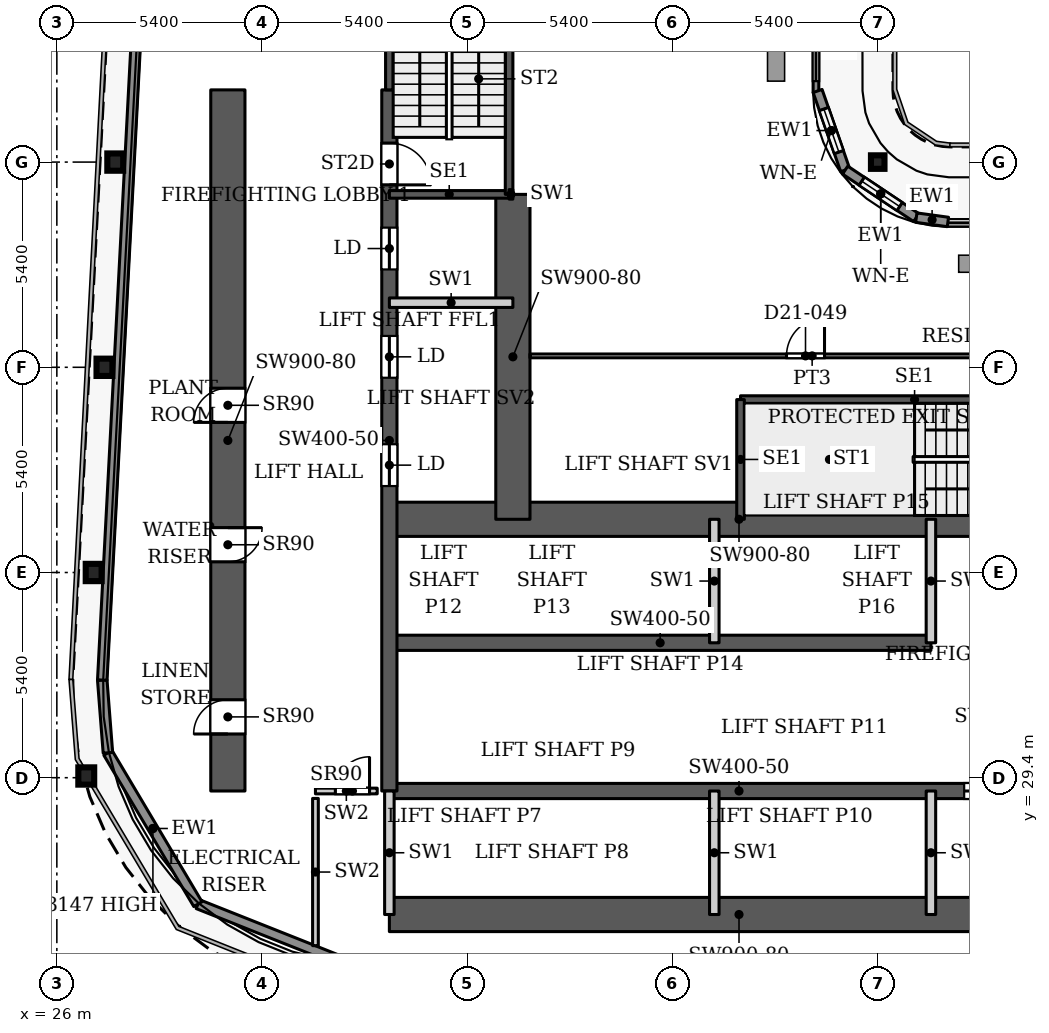
"""IFC4 building model, lengths in metres.
Left out: names, types, materials, properties, quantities, classifications, styles, units other than length and angle.
Written with IfcOpenShell. Run it as: python <this file> out.ifc"""

import sys

from ifc_helpers import new_model, si_unit, direction, frame, frame_2d, origin, origin_2d, place, context, subcontext, project, spatial, rectangle, hollow_rectangle, i_section, extrude, source, transform, mapped, element, fill, save


model = new_model("IFC4")
c1 = context("Model", 3, precision=1e-05, world=origin(), true_north=direction((0.0, 1.0)))
c2 = subcontext(c1, "Body", "Model", "MODEL_VIEW")
j1 = project(units=[si_unit("LENGTHUNIT", "METRE"), si_unit("PLANEANGLEUNIT", "RADIAN")], contexts=[c1])
p1 = place(None, origin())
s1 = spatial("IfcSite", under=j1, at=p1, CompositionType="ELEMENT")
p2 = place(p1, origin())
s2 = spatial("IfcBuilding", under=s1, at=p2, CompositionType="ELEMENT")
p3 = place(p2, frame((0.0, 0.0, 98.0)))
s3 = spatial("IfcBuildingStorey", under=s2, at=p3, CompositionType="ELEMENT", Elevation=98.0)
for number, where, z_axis, x_axis in (
    (1, (26.774, 29.445, 0.0), (0.0, 0.0, 1.0), (1.0, 0.0, 0.0)),
    (2, (26.969, 34.8, 0.0), (0.0, 0.0, 1.0), (1.0, 0.0, 0.0)),
    (3, (27.253, 40.2, 0.0), (0.0, 0.0, 1.0), (1.0, 0.0, 0.0)),
    (4, (27.537, 45.6, 0.0), (0.0, 0.0, 1.0), (1.0, 0.0, 0.0)),
):
    element("IfcColumn", number, at=place(p3, frame(where, z_axis=z_axis, x_axis=x_axis)), inside=s3, PredefinedType="COLUMN", context=c2, shape_type="SweptSolid", body=[
        extrude(i_section(OverallWidth=0.418, OverallDepth=0.455, WebThickness=0.042, FlangeThickness=0.068, FilletRadius=0.014, at=origin_2d()), origin(), (0.0, 0.0, 1.0), 3.9),
    ])
p4 = place(p3, frame((47.6, 45.6, 0.0), z_axis=(0.0, 0.0, 1.0), x_axis=(1.0, 0.0, 0.0)))
e5 = element("IfcColumn", 5, at=p4, inside=s3, PredefinedType="COLUMN", context=c2, shape_type="SweptSolid", body=[
    extrude(hollow_rectangle(XDim=0.356, YDim=0.356, WallThickness=0.016, InnerFilletRadius=0.016, OuterFilletRadius=0.032, at=origin_2d()), origin(), (0.0, 0.0, 1.0), 3.9),
])
p5 = place(p3, frame((34.75, 25.8, 0.0), z_axis=(0.0, 0.0, 1.0), x_axis=(1.0, 0.0, 0.0)))
e6 = element("IfcWall", 6, at=p5, inside=s3, PredefinedType="SHEAR", context=c2, shape_type="SweptSolid", body=[
    extrude(rectangle(XDim=18.4, YDim=0.9, at=frame_2d((9.2, 0.0))), origin(), (0.0, 0.0, 1.0), 3.9),
])
p6 = place(p3, frame((34.75, 29.05, 0.0), z_axis=(0.0, 0.0, 1.0), x_axis=(1.0, 0.0, 0.0)))
e7 = element("IfcWall", 7, at=p6, inside=s3, PredefinedType="SHEAR", context=c2, shape_type="SweptSolid", body=[
    extrude(rectangle(XDim=18.4, YDim=0.4, at=frame_2d((9.2, 0.0))), origin(), (0.0, 0.0, 1.0), 3.9),
])
p7 = place(p6, frame((15.125, 0.0, 0.0)))
e8 = element("IfcOpeningElement", 8, at=p7, cuts=e7, PredefinedType="OPENING", context=c2, shape_type="SweptSolid", body=[
    extrude(rectangle(XDim=1.1, YDim=2.2, at=frame_2d((0.55, 1.1))), frame((0.0, 0.21, 0.0), z_axis=(0.0, -1.0, 0.0), x_axis=(1.0, 0.0, 0.0)), (0.0, 0.0, 1.0), 0.42),
])
p8 = place(p3, frame((34.75, 32.95, 0.0), z_axis=(0.0, 0.0, 1.0), x_axis=(1.0, 0.0, 0.0)))
e9 = element("IfcWall", 9, at=p8, inside=s3, PredefinedType="SHEAR", context=c2, shape_type="SweptSolid", body=[
    extrude(rectangle(XDim=14.25, YDim=0.4, at=frame_2d((7.125, 0.0))), origin(), (0.0, 0.0, 1.0), 3.9),
])
p9 = place(p3, frame((34.75, 36.2, 0.0), z_axis=(0.0, 0.0, 1.0), x_axis=(1.0, 0.0, 0.0)))
e10 = element("IfcWall", 10, at=p9, inside=s3, PredefinedType="SHEAR", context=c2, shape_type="SweptSolid", body=[
    extrude(rectangle(XDim=18.4, YDim=0.9, at=frame_2d((9.2, 0.0))), origin(), (0.0, 0.0, 1.0), 3.9),
])
p10 = place(p9, frame((16.9, 0.0, 0.0)))
e11 = element("IfcOpeningElement", 11, at=p10, cuts=e10, PredefinedType="OPENING", context=c2, shape_type="SweptSolid", body=[
    extrude(rectangle(XDim=1.0, YDim=2.2, at=frame_2d((0.5, 1.1))), frame((0.0, 0.46, 0.0), z_axis=(0.0, -1.0, 0.0), x_axis=(1.0, 0.0, 0.0)), (0.0, 0.0, 1.0), 0.92),
])
p11 = place(p3, frame((34.75, 29.05, 0.0), z_axis=(0.0, 0.0, 1.0), x_axis=(0.0, 1.0, 0.0)))
e12 = element("IfcWall", 12, at=p11, inside=s3, PredefinedType="SHEAR", context=c2, shape_type="SweptSolid", body=[
    extrude(rectangle(XDim=18.45, YDim=0.4, at=frame_2d((9.225, 0.0))), origin(), (0.0, 0.0, 1.0), 3.9),
])
p12 = place(p11, frame((8.025, 0.0, 0.0)))
e13 = element("IfcOpeningElement", 13, at=p12, cuts=e12, PredefinedType="OPENING", context=c2, shape_type="SweptSolid", body=[
    extrude(rectangle(XDim=1.1, YDim=2.2, at=frame_2d((0.55, 1.1))), frame((0.0, 0.21, 0.0), z_axis=(0.0, -1.0, 0.0), x_axis=(1.0, 0.0, 0.0)), (0.0, 0.0, 1.0), 0.42),
])
p13 = place(p11, frame((10.875, 0.0, 0.0)))
e14 = element("IfcOpeningElement", 14, at=p13, cuts=e12, PredefinedType="OPENING", context=c2, shape_type="SweptSolid", body=[
    extrude(rectangle(XDim=1.1, YDim=2.2, at=frame_2d((0.55, 1.1))), frame((0.0, 0.21, 0.0), z_axis=(0.0, -1.0, 0.0), x_axis=(1.0, 0.0, 0.0)), (0.0, 0.0, 1.0), 0.42),
])
p14 = place(p11, frame((13.725, 0.0, 0.0)))
e15 = element("IfcOpeningElement", 15, at=p14, cuts=e12, PredefinedType="OPENING", context=c2, shape_type="SweptSolid", body=[
    extrude(rectangle(XDim=1.1, YDim=2.2, at=frame_2d((0.55, 1.1))), frame((0.0, 0.21, 0.0), z_axis=(0.0, -1.0, 0.0), x_axis=(1.0, 0.0, 0.0)), (0.0, 0.0, 1.0), 0.42),
])
p15 = place(p11, frame((15.95, 0.0, 0.0)))
e16 = element("IfcOpeningElement", 16, at=p15, cuts=e12, PredefinedType="OPENING", context=c2, shape_type="SweptSolid", body=[
    extrude(rectangle(XDim=1.1, YDim=2.2, at=frame_2d((0.55, 1.1))), frame((0.0, 0.21, 0.0), z_axis=(0.0, -1.0, 0.0), x_axis=(1.0, 0.0, 0.0)), (0.0, 0.0, 1.0), 0.42),
])
p16 = place(p3, frame((38.0, 36.2, 0.0), z_axis=(0.0, 0.0, 1.0), x_axis=(0.0, 1.0, 0.0)))
e17 = element("IfcWall", 17, at=p16, inside=s3, PredefinedType="SHEAR", context=c2, shape_type="SweptSolid", body=[
    extrude(rectangle(XDim=8.55, YDim=0.9, at=frame_2d((4.275, 0.0))), origin(), (0.0, 0.0, 1.0), 3.9),
])
p17 = place(p3, frame((30.5, 29.05, 0.0), z_axis=(0.0, 0.0, 1.0), x_axis=(0.0, 1.0, 0.0)))
e18 = element("IfcWall", 18, at=p17, inside=s3, PredefinedType="SHEAR", context=c2, shape_type="SweptSolid", body=[
    extrude(rectangle(XDim=18.45, YDim=0.9, at=frame_2d((9.225, 0.0))), origin(), (0.0, 0.0, 1.0), 3.9),
])
p18 = place(p17, frame((1.5, 0.0, 0.0)))
e19 = element("IfcOpeningElement", 19, at=p18, cuts=e18, PredefinedType="OPENING", context=c2, shape_type="SweptSolid", body=[
    extrude(rectangle(XDim=0.9, YDim=2.2, at=frame_2d((0.45, 1.1))), frame((0.0, 0.46, 0.0), z_axis=(0.0, -1.0, 0.0), x_axis=(1.0, 0.0, 0.0)), (0.0, 0.0, 1.0), 0.92),
])
p19 = place(p17, frame((6.03, 0.0, 0.0)))
e20 = element("IfcOpeningElement", 20, at=p19, cuts=e18, PredefinedType="OPENING", context=c2, shape_type="SweptSolid", body=[
    extrude(rectangle(XDim=0.9, YDim=2.2, at=frame_2d((0.45, 1.1))), frame((0.0, 0.46, 0.0), z_axis=(0.0, -1.0, 0.0), x_axis=(1.0, 0.0, 0.0)), (0.0, 0.0, 1.0), 0.92),
])
p20 = place(p17, frame((9.7, 0.0, 0.0)))
e21 = element("IfcOpeningElement", 21, at=p20, cuts=e18, PredefinedType="OPENING", context=c2, shape_type="SweptSolid", body=[
    extrude(rectangle(XDim=0.9, YDim=2.2, at=frame_2d((0.45, 1.1))), frame((0.0, 0.46, 0.0), z_axis=(0.0, -1.0, 0.0), x_axis=(1.0, 0.0, 0.0)), (0.0, 0.0, 1.0), 0.92),
])
p21 = place(p3, frame((45.975, 49.83, 0.0), z_axis=(0.0, 0.0, 1.0), x_axis=(0.0, -1.0, 0.0)))
e22 = element("IfcWall", 22, at=p21, inside=s3, PredefinedType="SOLIDWALL", context=c2, shape_type="SweptSolid", body=[
    extrude(rectangle(XDim=2.4, YDim=0.15, at=frame_2d((1.2, 0.0))), origin(), (0.0, 0.0, 1.0), 3.75),
])
p22 = place(p21, frame((0.3, 0.0, 0.0)))
e23 = element("IfcOpeningElement", 23, at=p22, cuts=e22, PredefinedType="OPENING", context=c2, shape_type="SweptSolid", body=[
    extrude(rectangle(XDim=1.8, YDim=2.4, at=frame_2d((0.9, 1.2))), frame((0.0, 0.085, 0.0), z_axis=(0.0, -1.0, 0.0), x_axis=(1.0, 0.0, 0.0)), (0.0, 0.0, 1.0), 0.17),
])
p23 = place(p3, frame((46.018, 47.471, 0.0), z_axis=(0.0, 0.0, 1.0), x_axis=(0.328791208903, -0.944402637093, 0.0)))
e24 = element("IfcWall", 24, at=p23, inside=s3, PredefinedType="SOLIDWALL", context=c2, shape_type="SweptSolid", body=[
    extrude(rectangle(XDim=2.205, YDim=0.25, at=frame_2d((1.102, 0.0))), origin(), (0.0, 0.0, 1.0), 3.75),
])
p24 = place(p23, frame((0.503, 0.0, 0.6)))
e25 = element("IfcOpeningElement", 25, at=p24, cuts=e24, PredefinedType="OPENING", context=c2, shape_type="SweptSolid", body=[
    extrude(rectangle(XDim=1.2, YDim=2.1, at=frame_2d((0.6, 1.05))), frame((0.0, 0.135, 0.0), z_axis=(0.0, -1.0, 0.0), x_axis=(1.0, 0.0, 0.0)), (0.0, 0.0, 1.0), 0.27),
])
p25 = place(p3, frame((46.743, 45.389, 0.0), z_axis=(0.0, 0.0, 1.0), x_axis=(0.831449265529, -0.555600682912, 0.0)))
e26 = element("IfcWall", 26, at=p25, inside=s3, PredefinedType="SOLIDWALL", context=c2, shape_type="SweptSolid", body=[
    extrude(rectangle(XDim=2.251, YDim=0.25, at=frame_2d((1.126, 0.0))), origin(), (0.0, 0.0, 1.0), 3.75),
])
p26 = place(p25, frame((0.525, 0.0, 0.6)))
e27 = element("IfcOpeningElement", 27, at=p26, cuts=e26, PredefinedType="OPENING", context=c2, shape_type="SweptSolid", body=[
    extrude(rectangle(XDim=1.2, YDim=2.1, at=frame_2d((0.6, 1.05))), frame((0.0, 0.135, 0.0), z_axis=(0.0, -1.0, 0.0), x_axis=(1.0, 0.0, 0.0)), (0.0, 0.0, 1.0), 0.27),
])
p27 = place(p3, frame((48.615, 44.138, 0.0), z_axis=(0.0, 0.0, 1.0), x_axis=(0.990741504246, -0.135761819977, 0.0)))
e28 = element("IfcWall", 28, at=p27, inside=s3, PredefinedType="SOLIDWALL", context=c2, shape_type="SweptSolid", body=[
    extrude(rectangle(XDim=0.84, YDim=0.25, at=frame_2d((0.42, 0.0))), origin(), (0.0, 0.0, 1.0), 3.75),
])
p28 = place(p3, frame((34.039, 24.353, 0.0), z_axis=(0.0, 0.0, 1.0), x_axis=(-0.929352825399, 0.369192803184, 0.0)))
e29 = element("IfcWall", 29, at=p28, inside=s3, PredefinedType="SOLIDWALL", context=c2, shape_type="SweptSolid", body=[
    extrude(rectangle(XDim=4.656, YDim=0.25, at=frame_2d((2.328, 0.0))), origin(), (0.0, 0.0, 1.0), 3.75),
])
p29 = place(p3, frame((29.712, 26.072, 0.0), z_axis=(0.0, 0.0, 1.0), x_axis=(-0.511028049012, 0.859564036662, 0.0)))
e30 = element("IfcWall", 30, at=p29, inside=s3, PredefinedType="SOLIDWALL", context=c2, shape_type="SweptSolid", body=[
    extrude(rectangle(XDim=4.634, YDim=0.25, at=frame_2d((2.317, 0.0))), origin(), (0.0, 0.0, 1.0), 3.147),
])
p30 = place(p3, frame((27.344, 30.055, 0.0), z_axis=(0.0, 0.0, 1.0), x_axis=(-0.077571675317, 0.99698677784, 0.0)))
e31 = element("IfcWall", 31, at=p30, inside=s3, PredefinedType="SOLIDWALL", context=c2, shape_type="SweptSolid", body=[
    extrude(rectangle(XDim=1.92, YDim=0.25, at=frame_2d((0.96, 0.0))), origin(), (0.0, 0.0, 1.0), 3.75),
])
p31 = place(p3, frame((27.195, 31.969, 0.0), z_axis=(0.0, 0.0, 1.0), x_axis=(0.052559748861, 0.998617781135, 0.0)))
e32 = element("IfcWall", 32, at=p31, inside=s3, PredefinedType="SOLIDWALL", context=c2, shape_type="SweptSolid", body=[
    extrude(rectangle(XDim=55.972, YDim=0.25, at=frame_2d((27.986, 0.0))), origin(), (0.0, 0.0, 1.0), 3.75),
])
p32 = place(p3, frame((43.99, 39.35, 0.0), z_axis=(0.0, 0.0, 1.0), x_axis=(1.0, 0.0, 0.0)))
e33 = element("IfcWall", 33, at=p32, inside=s3, PredefinedType="SHEAR", context=c2, shape_type="SweptSolid", body=[
    extrude(rectangle(XDim=9.16, YDim=0.2, at=frame_2d((4.58, 0.0))), origin(), (0.0, 0.0, 1.0), 3.9),
])
p33 = place(p3, frame((43.99, 36.2, 0.0), z_axis=(0.0, 0.0, 1.0), x_axis=(0.0, 1.0, 0.0)))
e34 = element("IfcWall", 34, at=p33, inside=s3, PredefinedType="SHEAR", context=c2, shape_type="SweptSolid", body=[
    extrude(rectangle(XDim=3.15, YDim=0.2, at=frame_2d((1.575, 0.0))), origin(), (0.0, 0.0, 1.0), 3.9),
])
p34 = place(p3, frame((34.75, 44.75, 0.0), z_axis=(0.0, 0.0, 1.0), x_axis=(1.0, 0.0, 0.0)))
e35 = element("IfcWall", 35, at=p34, inside=s3, PredefinedType="SHEAR", context=c2, shape_type="SweptSolid", body=[
    extrude(rectangle(XDim=3.15, YDim=0.2, at=frame_2d((1.575, 0.0))), origin(), (0.0, 0.0, 1.0), 3.9),
])
p35 = place(p3, frame((34.75, 47.5, 0.0), z_axis=(0.0, 0.0, 1.0), x_axis=(0.0, 1.0, 0.0)))
e36 = element("IfcWall", 36, at=p35, inside=s3, PredefinedType="SHEAR", context=c2, shape_type="SweptSolid", body=[
    extrude(rectangle(XDim=6.41, YDim=0.2, at=frame_2d((3.205, 0.0))), origin(), (0.0, 0.0, 1.0), 3.9),
])
p36 = place(p3, frame((37.9, 44.75, 0.0), z_axis=(0.0, 0.0, 1.0), x_axis=(0.0, 1.0, 0.0)))
e37 = element("IfcWall", 37, at=p36, inside=s3, PredefinedType="SHEAR", context=c2, shape_type="SweptSolid", body=[
    extrude(rectangle(XDim=9.16, YDim=0.2, at=frame_2d((4.58, 0.0))), origin(), (0.0, 0.0, 1.0), 3.9),
])
for number, where, z_axis, x_axis in (
    (38, (34.75, 25.8, 0.0), (0.0, 0.0, 1.0), (0.0, 1.0, 0.0)),
    (39, (43.3, 25.8, 0.0), (0.0, 0.0, 1.0), (0.0, 1.0, 0.0)),
    (40, (43.3, 32.95, 0.0), (0.0, 0.0, 1.0), (0.0, 1.0, 0.0)),
    (41, (49.0, 25.8, 0.0), (0.0, 0.0, 1.0), (0.0, 1.0, 0.0)),
    (42, (49.0, 32.95, 0.0), (0.0, 0.0, 1.0), (0.0, 1.0, 0.0)),
    (43, (34.75, 41.9, 0.0), (0.0, 0.0, 1.0), (1.0, 0.0, 0.0)),
):
    element("IfcWall", number, at=place(p3, frame(where, z_axis=z_axis, x_axis=x_axis)), inside=s3, PredefinedType="PARTITIONING", context=c2, shape_type="SweptSolid", body=[
        extrude(rectangle(XDim=3.25, YDim=0.25, at=frame_2d((1.625, 0.0))), origin(), (0.0, 0.0, 1.0), 3.9),
    ])
p37 = place(p3, frame((37.9, 44.75, 0.0), z_axis=(0.0, 0.0, 1.0), x_axis=(1.0, 0.0, 0.0)))
e44 = element("IfcWall", 44, at=p37, inside=s3, PredefinedType="PARTITIONING", context=c2, shape_type="SweptSolid", body=[
    extrude(rectangle(XDim=0.1, YDim=0.25, at=frame_2d((0.05, 0.0))), origin(), (0.0, 0.0, 1.0), 3.9),
])
p38 = place(p3, frame((32.805, 29.05, 0.0), z_axis=(0.0, 0.0, 1.0), x_axis=(1.0, 0.0, 0.0)))
e45 = element("IfcWall", 45, at=p38, inside=s3, PredefinedType="PARTITIONING", context=c2, shape_type="SweptSolid", body=[
    extrude(rectangle(XDim=1.625, YDim=0.15, at=frame_2d((0.812, 0.0))), origin(), (0.0, 0.0, 1.0), 3.9),
])
p39 = place(p38, frame((0.523, 0.0, 0.0)))
e46 = element("IfcOpeningElement", 46, at=p39, cuts=e45, PredefinedType="OPENING", context=c2, shape_type="SweptSolid", body=[
    extrude(rectangle(XDim=0.9, YDim=2.2, at=frame_2d((0.45, 1.1))), frame((0.0, 0.085, 0.0), z_axis=(0.0, -1.0, 0.0), x_axis=(1.0, 0.0, 0.0)), (0.0, 0.0, 1.0), 0.17),
])
p40 = place(p3, frame((32.805, 24.98, 0.0), z_axis=(0.0, 0.0, 1.0), x_axis=(0.0, 1.0, 0.0)))
e47 = element("IfcWall", 47, at=p40, inside=s3, PredefinedType="PARTITIONING", context=c2, shape_type="SweptSolid", body=[
    extrude(rectangle(XDim=3.875, YDim=0.15, at=frame_2d((1.938, 0.0))), origin(), (0.0, 0.0, 1.0), 3.9),
])
p41 = place(p3, frame((38.449, 40.5, 0.0), z_axis=(0.0, 0.0, 1.0), x_axis=(1.0, 0.0, 0.0)))
e48 = element("IfcWall", 48, at=p41, inside=s3, PredefinedType="PARTITIONING", context=c2, shape_type="SweptSolid", body=[
    extrude(rectangle(XDim=14.851, YDim=0.1, at=frame_2d((7.426, 0.0))), origin(), (0.0, 0.0, 1.0), 3.6),
])
p42 = place(p41, frame((6.751, 0.0, 0.0)))
e49 = element("IfcOpeningElement", 49, at=p42, cuts=e48, PredefinedType="OPENING", context=c2, shape_type="SweptSolid", body=[
    extrude(rectangle(XDim=1.0, YDim=2.1, at=frame_2d((0.5, 1.05))), frame((0.0, 0.06, 0.0), z_axis=(0.0, -1.0, 0.0), x_axis=(1.0, 0.0, 0.0)), (0.0, 0.0, 1.0), 0.12),
])
m1 = source(origin(), c2, "Body", "SweptSolid", [
    extrude(rectangle(XDim=1.8, YDim=2.4, at=frame_2d((0.9, 1.2))), frame((0.0, 0.025, 0.0), z_axis=(0.0, -1.0, 0.0), x_axis=(1.0, 0.0, 0.0)), (0.0, 0.0, 1.0), 0.05),
])
p43 = place(p22, origin())
e50 = element("IfcDoor", 50, at=p43, inside=s3, OperationType="SLIDING_TO_LEFT", PredefinedType="DOOR", context=c2, shape_type="MappedRepresentation", body=[
    mapped(m1, transform((0.0, 0.0, 0.0), x_axis=(1.0, 0.0, 0.0), y_axis=(0.0, 1.0, 0.0), z_axis=(0.0, 0.0, 1.0), scale=1.0)),
])
fill(e23, e50)
m2 = source(origin(), c2, "Body", "SweptSolid", [
    extrude(rectangle(XDim=1.2, YDim=2.1, at=frame_2d((0.6, 1.05))), frame((0.0, 0.03, 0.0), z_axis=(0.0, -1.0, 0.0), x_axis=(1.0, 0.0, 0.0)), (0.0, 0.0, 1.0), 0.06),
])
p44 = place(p24, origin())
e51 = element("IfcWindow", 51, at=p44, inside=s3, PartitioningType="SINGLE_PANEL", PredefinedType="WINDOW", context=c2, shape_type="MappedRepresentation", body=[
    mapped(m2, transform((0.0, 0.0, 0.0), x_axis=(1.0, 0.0, 0.0), y_axis=(0.0, 1.0, 0.0), z_axis=(0.0, 0.0, 1.0), scale=1.0)),
])
fill(e25, e51)
p45 = place(p26, origin())
e52 = element("IfcWindow", 52, at=p45, inside=s3, PartitioningType="SINGLE_PANEL", PredefinedType="WINDOW", context=c2, shape_type="MappedRepresentation", body=[
    mapped(m2, transform((0.0, 0.0, 0.0), x_axis=(1.0, 0.0, 0.0), y_axis=(0.0, 1.0, 0.0), z_axis=(0.0, 0.0, 1.0), scale=1.0)),
])
fill(e27, e52)
m3 = source(origin(), c2, "Body", "SweptSolid", [
    extrude(rectangle(XDim=1.1, YDim=2.2, at=frame_2d((0.55, 1.1))), frame((0.0, 0.025, 0.0), z_axis=(0.0, -1.0, 0.0), x_axis=(1.0, 0.0, 0.0)), (0.0, 0.0, 1.0), 0.05),
])
p46 = place(p12, origin())
e53 = element("IfcDoor", 53, at=p46, inside=s3, OperationType="SLIDING_TO_LEFT", PredefinedType="DOOR", context=c2, shape_type="MappedRepresentation", body=[
    mapped(m3, transform((0.0, 0.0, 0.0), x_axis=(1.0, 0.0, 0.0), y_axis=(0.0, 1.0, 0.0), z_axis=(0.0, 0.0, 1.0), scale=1.0)),
])
fill(e13, e53)
p47 = place(p13, origin())
e54 = element("IfcDoor", 54, at=p47, inside=s3, OperationType="SLIDING_TO_LEFT", PredefinedType="DOOR", context=c2, shape_type="MappedRepresentation", body=[
    mapped(m3, transform((0.0, 0.0, 0.0), x_axis=(1.0, 0.0, 0.0), y_axis=(0.0, 1.0, 0.0), z_axis=(0.0, 0.0, 1.0), scale=1.0)),
])
fill(e14, e54)
p48 = place(p14, origin())
e55 = element("IfcDoor", 55, at=p48, inside=s3, OperationType="SLIDING_TO_LEFT", PredefinedType="DOOR", context=c2, shape_type="MappedRepresentation", body=[
    mapped(m3, transform((0.0, 0.0, 0.0), x_axis=(1.0, 0.0, 0.0), y_axis=(0.0, 1.0, 0.0), z_axis=(0.0, 0.0, 1.0), scale=1.0)),
])
fill(e15, e55)
p49 = place(p7, origin())
e56 = element("IfcDoor", 56, at=p49, inside=s3, OperationType="SLIDING_TO_LEFT", PredefinedType="DOOR", context=c2, shape_type="MappedRepresentation", body=[
    mapped(m3, transform((0.0, 0.0, 0.0), x_axis=(1.0, 0.0, 0.0), y_axis=(0.0, 1.0, 0.0), z_axis=(0.0, 0.0, 1.0), scale=1.0)),
])
fill(e8, e56)
m4 = source(origin(), c2, "Body", "SweptSolid", [
    extrude(rectangle(XDim=0.9, YDim=2.2, at=frame_2d((0.45, 1.1))), frame((0.0, 0.025, 0.0), z_axis=(0.0, -1.0, 0.0), x_axis=(1.0, 0.0, 0.0)), (0.0, 0.0, 1.0), 0.05),
])
p50 = place(p18, origin())
e57 = element("IfcDoor", 57, at=p50, inside=s3, OperationType="SINGLE_SWING_LEFT", PredefinedType="DOOR", context=c2, shape_type="MappedRepresentation", body=[
    mapped(m4, transform((0.0, 0.0, 0.0), x_axis=(1.0, 0.0, 0.0), y_axis=(0.0, 1.0, 0.0), z_axis=(0.0, 0.0, 1.0), scale=1.0)),
])
fill(e19, e57)
p51 = place(p19, origin())
e58 = element("IfcDoor", 58, at=p51, inside=s3, OperationType="SINGLE_SWING_RIGHT", PredefinedType="DOOR", context=c2, shape_type="MappedRepresentation", body=[
    mapped(m4, transform((0.0, 0.0, 0.0), x_axis=(1.0, 0.0, 0.0), y_axis=(0.0, 1.0, 0.0), z_axis=(0.0, 0.0, 1.0), scale=1.0)),
])
fill(e20, e58)
p52 = place(p20, origin())
e59 = element("IfcDoor", 59, at=p52, inside=s3, OperationType="SINGLE_SWING_LEFT", PredefinedType="DOOR", context=c2, shape_type="MappedRepresentation", body=[
    mapped(m4, transform((0.0, 0.0, 0.0), x_axis=(1.0, 0.0, 0.0), y_axis=(0.0, 1.0, 0.0), z_axis=(0.0, 0.0, 1.0), scale=1.0)),
])
fill(e21, e59)
p53 = place(p39, origin())
e60 = element("IfcDoor", 60, at=p53, inside=s3, OperationType="SINGLE_SWING_LEFT", PredefinedType="DOOR", context=c2, shape_type="MappedRepresentation", body=[
    mapped(m4, transform((0.0, 0.0, 0.0), x_axis=(1.0, 0.0, 0.0), y_axis=(0.0, 1.0, 0.0), z_axis=(0.0, 0.0, 1.0), scale=1.0)),
])
fill(e46, e60)
m5 = source(origin(), c2, "Body", "SweptSolid", [
    extrude(rectangle(XDim=1.1, YDim=2.2, at=frame_2d((0.55, 1.1))), frame((0.0, 0.025, 0.0), z_axis=(0.0, -1.0, 0.0), x_axis=(1.0, 0.0, 0.0)), (0.0, 0.0, 1.0), 0.05),
])
p54 = place(p15, origin())
e61 = element("IfcDoor", 61, at=p54, inside=s3, OperationType="SINGLE_SWING_RIGHT", PredefinedType="DOOR", context=c2, shape_type="MappedRepresentation", body=[
    mapped(m5, transform((0.0, 0.0, 0.0), x_axis=(1.0, 0.0, 0.0), y_axis=(0.0, 1.0, 0.0), z_axis=(0.0, 0.0, 1.0), scale=1.0)),
])
fill(e16, e61)
m6 = source(origin(), c2, "Body", "SweptSolid", [
    extrude(rectangle(XDim=1.0, YDim=2.1, at=frame_2d((0.5, 1.05))), frame((0.0, 0.025, 0.0), z_axis=(0.0, -1.0, 0.0), x_axis=(1.0, 0.0, 0.0)), (0.0, 0.0, 1.0), 0.05),
])
p55 = place(p42, origin())
e62 = element("IfcDoor", 62, at=p55, inside=s3, OperationType="SINGLE_SWING_LEFT", PredefinedType="DOOR", context=c2, shape_type="MappedRepresentation", body=[
    mapped(m6, transform((0.0, 0.0, 0.0), x_axis=(1.0, 0.0, 0.0), y_axis=(0.0, 1.0, 0.0), z_axis=(0.0, 0.0, 1.0), scale=1.0)),
])
fill(e49, e62)
save(model, sys.argv[1])
